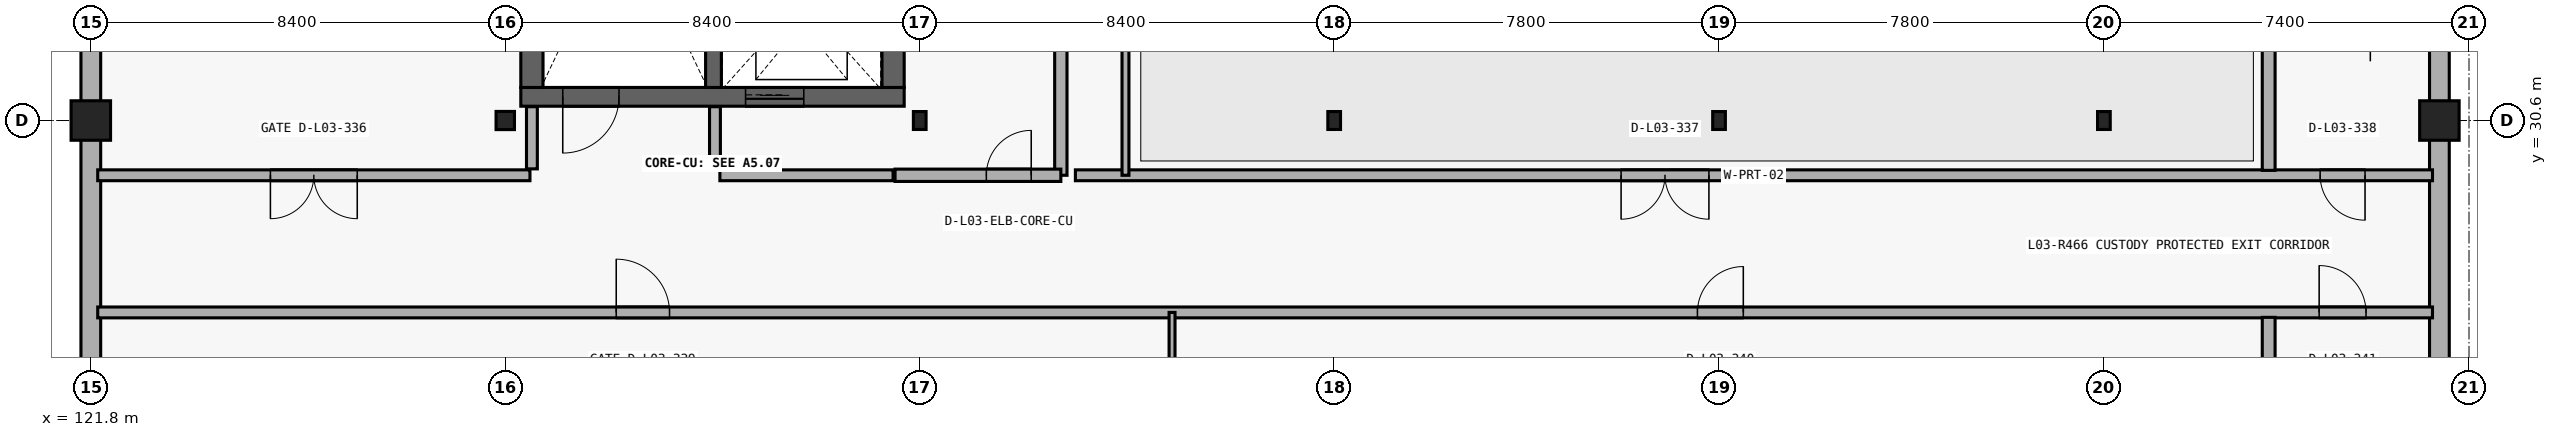
"""IFC4 building model, lengths in metres.
Left out: names, types, materials, properties, quantities, classifications, styles, units other than length and angle.
Written with IfcOpenShell. Run it as: python <this file> out.ifc"""

import sys

from ifc_helpers import new_model, si_unit, direction, frame, frame_2d, origin_with_axes, origin_2d_with_axis, place, context, subcontext, project, spatial, rectangle, circle, i_section, extrude, element, fill, save


model = new_model("IFC4")
c1 = context("Model", 3, precision=1e-05, world=origin_with_axes(), true_north=direction((0.0, 1.0)))
c2 = subcontext(c1, "Body", "Model", "MODEL_VIEW")
j1 = project(units=[si_unit("LENGTHUNIT", "METRE"), si_unit("PLANEANGLEUNIT", "RADIAN")], contexts=[c1])
p1 = place(None, origin_with_axes())
s1 = spatial("IfcSite", under=j1, at=p1, CompositionType="ELEMENT")
p2 = place(p1, origin_with_axes())
s2 = spatial("IfcBuilding", under=s1, at=p2, CompositionType="ELEMENT")
p3 = place(p2, frame((0.0, 0.0, 15.6), z_axis=(0.0, 0.0, 1.0), x_axis=(1.0, 0.0, 0.0)))
s3 = spatial("IfcBuildingStorey", under=s2, at=p3, CompositionType="ELEMENT", Elevation=15.6)
p4 = place(None, frame((169.4, 7.06, 15.6), z_axis=(0.0, 0.0, 1.0), x_axis=(0.0, 1.0, 0.0)))
e1 = element("IfcWall", 1, at=p4, inside=s3, PredefinedType="SOLIDWALL", context=c2, shape_type="SweptSolid", body=[
    extrude(rectangle(XDim=47.28, YDim=0.4, at=frame_2d((23.64, 0.0), x_axis=(1.0, 0.0))), origin_with_axes(), (0.0, 0.0, 1.0), 4.074),
])
p5 = place(None, frame((121.8, 54.34, 15.6), z_axis=(0.0, 0.0, 1.0), x_axis=(0.0, -1.0, 0.0)))
e2 = element("IfcWall", 2, at=p5, inside=s3, PredefinedType="SOLIDWALL", context=c2, shape_type="SweptSolid", body=[
    extrude(rectangle(XDim=47.28, YDim=0.4, at=frame_2d((23.64, 0.0), x_axis=(1.0, 0.0))), origin_with_axes(), (0.0, 0.0, 1.0), 4.114),
])
p6 = place(None, frame((130.515, 31.08, 15.6), z_axis=(0.0, 0.0, 1.0), x_axis=(1.0, 0.0, 0.0)))
e3 = element("IfcWall", 3, at=p6, inside=s3, PredefinedType="SHEAR", context=c2, shape_type="SweptSolid", body=[
    extrude(rectangle(XDim=7.77, YDim=0.38, at=frame_2d((3.885, 0.0), x_axis=(1.0, 0.0))), origin_with_axes(), (0.0, 0.0, 1.0), 4.8),
])
p7 = place(None, frame((131.935, 31.08, 15.6), z_axis=(0.0, 0.0, 1.0), x_axis=(1.0, 0.0, 0.0)))
e4 = element("IfcOpeningElement", 4, at=p7, cuts=e3, PredefinedType="OPENING", context=c2, shape_type="SweptSolid", body=[
    extrude(rectangle(XDim=1.14, YDim=2.18, at=frame_2d((0.0, 1.09), x_axis=(1.0, 0.0))), frame((0.0, 0.2, 0.0), z_axis=(0.0, -1.0, 0.0), x_axis=(1.0, 0.0, 0.0)), (0.0, 0.0, 1.0), 0.4),
])
p8 = place(None, frame((135.66, 31.08, 15.6), z_axis=(0.0, 0.0, 1.0), x_axis=(1.0, 0.0, 0.0)))
e5 = element("IfcOpeningElement", 5, at=p8, cuts=e3, PredefinedType="OPENING", context=c2, shape_type="SweptSolid", body=[
    extrude(rectangle(XDim=1.18, YDim=2.24, at=frame_2d((0.0, 1.12), x_axis=(1.0, 0.0))), frame((0.0, 0.2, 0.0), z_axis=(0.0, -1.0, 0.0), x_axis=(1.0, 0.0, 0.0)), (0.0, 0.0, 1.0), 0.4),
])
p9 = place(None, frame((138.06, 31.27, 15.6), z_axis=(0.0, 0.0, 1.0), x_axis=(0.0, 1.0, 0.0)))
e6 = element("IfcWall", 6, at=p9, inside=s3, PredefinedType="SHEAR", context=c2, shape_type="SweptSolid", body=[
    extrude(rectangle(XDim=7.06, YDim=0.45, at=frame_2d((3.53, 0.0), x_axis=(1.0, 0.0))), origin_with_axes(), (0.0, 0.0, 1.0), 4.8),
])
p10 = place(None, frame((138.06, 37.07, 15.6), z_axis=(0.0, 0.0, 1.0), x_axis=(0.0, 1.0, 0.0)))
e7 = element("IfcOpeningElement", 7, at=p10, cuts=e6, PredefinedType="OPENING", context=c2, shape_type="SweptSolid", body=[
    extrude(rectangle(XDim=1.18, YDim=2.24, at=frame_2d((0.0, 1.12), x_axis=(1.0, 0.0))), frame((0.0, 0.235, 0.0), z_axis=(0.0, -1.0, 0.0), x_axis=(1.0, 0.0, 0.0)), (0.0, 0.0, 1.0), 0.47),
])
p11 = place(None, frame((130.74, 38.33, 15.6), z_axis=(0.0, 0.0, 1.0), x_axis=(0.0, -1.0, 0.0)))
e8 = element("IfcWall", 8, at=p11, inside=s3, PredefinedType="SHEAR", context=c2, shape_type="SweptSolid", body=[
    extrude(rectangle(XDim=7.06, YDim=0.45, at=frame_2d((3.53, 0.0), x_axis=(1.0, 0.0))), origin_with_axes(), (0.0, 0.0, 1.0), 4.8),
])
p12 = place(None, frame((134.42, 31.27, 15.6), z_axis=(0.0, 0.0, 1.0), x_axis=(0.0, 1.0, 0.0)))
e9 = element("IfcWall", 9, at=p12, inside=s3, PredefinedType="SHEAR", context=c2, shape_type="SweptSolid", body=[
    extrude(rectangle(XDim=7.06, YDim=0.32, at=frame_2d((3.53, 0.0), x_axis=(1.0, 0.0))), origin_with_axes(), (0.0, 0.0, 1.0), 4.8),
])
p13 = place(None, frame((141.46, 29.49, 15.6), z_axis=(0.0, 0.0, 1.0), x_axis=(0.0, 1.0, 0.0)))
e10 = element("IfcWall", 10, at=p13, inside=s3, PredefinedType="PARTITIONING", context=c2, shape_type="SweptSolid", body=[
    extrude(rectangle(XDim=9.03, YDim=0.25, at=frame_2d((4.515, 0.0), x_axis=(1.0, 0.0))), origin_with_axes(), (0.0, 0.0, 1.0), 4.48),
])
p14 = place(None, frame((138.1, 29.49, 15.6), z_axis=(0.0, 0.0, 1.0), x_axis=(1.0, 0.0, 0.0)))
e11 = element("IfcWall", 11, at=p14, inside=s3, PredefinedType="PARTITIONING", context=c2, shape_type="SweptSolid", body=[
    extrude(rectangle(XDim=3.36, YDim=0.25, at=frame_2d((1.68, 0.0), x_axis=(1.0, 0.0))), origin_with_axes(), (0.0, 0.0, 1.0), 4.48),
])
p15 = place(None, frame((140.405, 29.49, 15.6), z_axis=(0.0, 0.0, 1.0), x_axis=(1.0, 0.0, 0.0)))
e12 = element("IfcOpeningElement", 12, at=p15, cuts=e11, PredefinedType="OPENING", context=c2, shape_type="SweptSolid", body=[
    extrude(rectangle(XDim=0.91, YDim=2.12, at=frame_2d((0.0, 1.06), x_axis=(1.0, 0.0))), frame((0.0, 0.135, 0.0), z_axis=(0.0, -1.0, 0.0), x_axis=(1.0, 0.0, 0.0)), (0.0, 0.0, 1.0), 0.27),
])
for number, where, z_axis, x_axis in (
    (13, (130.74, 29.62, 15.6), (0.0, 0.0, 1.0), (0.0, 1.0, 0.0)),
    (14, (134.45, 29.62, 15.6), (0.0, 0.0, 1.0), (0.0, 1.0, 0.0)),
):
    element("IfcWall", number, at=place(None, frame(where, z_axis=z_axis, x_axis=x_axis)), inside=s3, PredefinedType="PARTITIONING", context=c2, shape_type="SweptSolid", body=[
        extrude(rectangle(XDim=1.26, YDim=0.22, at=frame_2d((0.63, 0.0), x_axis=(1.0, 0.0))), origin_with_axes(), (0.0, 0.0, 1.0), 4.48),
    ])
p16 = place(None, frame((121.94, 29.49, 15.6), z_axis=(0.0, 0.0, 1.0), x_axis=(1.0, 0.0, 0.0)))
e15 = element("IfcWall", 15, at=p16, inside=s3, PredefinedType="PARTITIONING", context=c2, shape_type="SweptSolid", body=[
    extrude(rectangle(XDim=8.76, YDim=0.22, at=frame_2d((4.38, 0.0), x_axis=(1.0, 0.0))), origin_with_axes(), (0.0, 0.0, 1.0), 4.48),
])
p17 = place(None, frame((126.32, 29.49, 15.6), z_axis=(0.0, 0.0, 1.0), x_axis=(1.0, 0.0, 0.0)))
e16 = element("IfcOpeningElement", 16, at=p17, cuts=e15, PredefinedType="OPENING", context=c2, shape_type="SweptSolid", body=[
    extrude(rectangle(XDim=1.76, YDim=2.26, at=frame_2d((0.0, 1.13), x_axis=(1.0, 0.0))), frame((0.0, 0.12, 0.0), z_axis=(0.0, -1.0, 0.0), x_axis=(1.0, 0.0, 0.0)), (0.0, 0.0, 1.0), 0.24),
])
p18 = place(None, frame((134.55, 29.49, 15.6), z_axis=(0.0, 0.0, 1.0), x_axis=(1.0, 0.0, 0.0)))
e17 = element("IfcWall", 17, at=p18, inside=s3, PredefinedType="PARTITIONING", context=c2, shape_type="SweptSolid", body=[
    extrude(rectangle(XDim=3.51, YDim=0.22, at=frame_2d((1.755, 0.0), x_axis=(1.0, 0.0))), origin_with_axes(), (0.0, 0.0, 1.0), 4.48),
])
p19 = place(None, frame((141.755, 29.49, 15.6), z_axis=(0.0, 0.0, 1.0), x_axis=(1.0, 0.0, 0.0)))
e18 = element("IfcWall", 18, at=p19, inside=s3, PredefinedType="PARTITIONING", context=c2, shape_type="SweptSolid", body=[
    extrude(rectangle(XDim=27.505, YDim=0.22, at=frame_2d((13.752, 0.0), x_axis=(1.0, 0.0))), origin_with_axes(), (0.0, 0.0, 1.0), 4.48),
])
p20 = place(None, frame((153.705, 29.49, 15.6), z_axis=(0.0, 0.0, 1.0), x_axis=(1.0, 0.0, 0.0)))
e19 = element("IfcOpeningElement", 19, at=p20, cuts=e18, PredefinedType="OPENING", context=c2, shape_type="SweptSolid", body=[
    extrude(rectangle(XDim=1.78, YDim=2.48, at=frame_2d((0.0, 1.24), x_axis=(1.0, 0.0))), frame((0.0, 0.12, 0.0), z_axis=(0.0, -1.0, 0.0), x_axis=(1.0, 0.0, 0.0)), (0.0, 0.0, 1.0), 0.24),
])
p21 = place(None, frame((167.438, 29.49, 15.6), z_axis=(0.0, 0.0, 1.0), x_axis=(1.0, 0.0, 0.0)))
e20 = element("IfcOpeningElement", 20, at=p21, cuts=e18, PredefinedType="OPENING", context=c2, shape_type="SweptSolid", body=[
    extrude(rectangle(XDim=0.91, YDim=2.12, at=frame_2d((0.0, 1.06), x_axis=(1.0, 0.0))), frame((0.0, 0.12, 0.0), z_axis=(0.0, -1.0, 0.0), x_axis=(1.0, 0.0, 0.0)), (0.0, 0.0, 1.0), 0.24),
])
p22 = place(None, frame((121.94, 26.71, 15.6), z_axis=(0.0, 0.0, 1.0), x_axis=(1.0, 0.0, 0.0)))
e21 = element("IfcWall", 21, at=p22, inside=s3, PredefinedType="PARTITIONING", context=c2, shape_type="SweptSolid", body=[
    extrude(rectangle(XDim=47.32, YDim=0.22, at=frame_2d((23.66, 0.0), x_axis=(1.0, 0.0))), origin_with_axes(), (0.0, 0.0, 1.0), 4.48),
])
p23 = place(None, frame((132.989, 26.71, 15.6), z_axis=(0.0, 0.0, 1.0), x_axis=(1.0, 0.0, 0.0)))
e22 = element("IfcOpeningElement", 22, at=p23, cuts=e21, PredefinedType="OPENING", context=c2, shape_type="SweptSolid", body=[
    extrude(rectangle(XDim=1.08, YDim=2.18, at=frame_2d((0.0, 1.09), x_axis=(1.0, 0.0))), frame((0.0, 0.12, 0.0), z_axis=(0.0, -1.0, 0.0), x_axis=(1.0, 0.0, 0.0)), (0.0, 0.0, 1.0), 0.24),
])
p24 = place(None, frame((154.827, 26.71, 15.6), z_axis=(0.0, 0.0, 1.0), x_axis=(1.0, 0.0, 0.0)))
e23 = element("IfcOpeningElement", 23, at=p24, cuts=e21, PredefinedType="OPENING", context=c2, shape_type="SweptSolid", body=[
    extrude(rectangle(XDim=0.93, YDim=2.1, at=frame_2d((0.0, 1.05), x_axis=(1.0, 0.0))), frame((0.0, 0.12, 0.0), z_axis=(0.0, -1.0, 0.0), x_axis=(1.0, 0.0, 0.0)), (0.0, 0.0, 1.0), 0.24),
])
p25 = place(None, frame((167.438, 26.71, 15.6), z_axis=(0.0, 0.0, 1.0), x_axis=(1.0, 0.0, 0.0)))
e24 = element("IfcOpeningElement", 24, at=p25, cuts=e21, PredefinedType="OPENING", context=c2, shape_type="SweptSolid", body=[
    extrude(rectangle(XDim=0.95, YDim=2.1, at=frame_2d((0.0, 1.05), x_axis=(1.0, 0.0))), frame((0.0, 0.12, 0.0), z_axis=(0.0, -1.0, 0.0), x_axis=(1.0, 0.0, 0.0)), (0.0, 0.0, 1.0), 0.24),
])
p26 = place(None, frame((165.94, 29.59, 15.6), z_axis=(0.0, 0.0, 1.0), x_axis=(0.0, 1.0, 0.0)))
e25 = element("IfcWall", 25, at=p26, inside=s3, PredefinedType="PLUMBINGWALL", context=c2, shape_type="SweptSolid", body=[
    extrude(rectangle(XDim=6.43, YDim=0.26, at=frame_2d((3.215, 0.0), x_axis=(1.0, 0.0))), origin_with_axes(), (0.0, 0.0, 1.0), 4.48),
])
p27 = place(None, frame((165.94, 20.18, 15.6), z_axis=(0.0, 0.0, 1.0), x_axis=(0.0, 1.0, 0.0)))
e26 = element("IfcWall", 26, at=p27, inside=s3, PredefinedType="PLUMBINGWALL", context=c2, shape_type="SweptSolid", body=[
    extrude(rectangle(XDim=6.43, YDim=0.26, at=frame_2d((3.215, 0.0), x_axis=(1.0, 0.0))), origin_with_axes(), (0.0, 0.0, 1.0), 4.48),
])
p28 = place(None, frame((142.77, 29.49, 15.6), z_axis=(0.0, 0.0, 1.0), x_axis=(0.0, 1.0, 0.0)))
e27 = element("IfcWall", 27, at=p28, inside=s3, PredefinedType="PARTITIONING", context=c2, shape_type="SweptSolid", body=[
    extrude(rectangle(XDim=24.97, YDim=0.14, at=frame_2d((12.485, 0.0), x_axis=(1.0, 0.0))), origin_with_axes(), (0.0, 0.0, 1.0), 4.48),
])
p29 = place(None, frame((143.714, 6.94, 15.6), z_axis=(0.0, 0.0, 1.0), x_axis=(0.0, 1.0, 0.0)))
e28 = element("IfcWall", 28, at=p29, inside=s3, PredefinedType="PARTITIONING", context=c2, shape_type="SweptSolid", body=[
    extrude(rectangle(XDim=19.77, YDim=0.12, at=frame_2d((9.885, 0.0), x_axis=(1.0, 0.0))), origin_with_axes(), (0.0, 0.0, 1.0), 4.48),
])
p30 = place(None, frame((121.8, 30.6, 15.6), z_axis=(0.0, 0.0, 1.0), x_axis=(1.0, 0.0, 0.0)))
e29 = element("IfcColumn", 29, at=p30, inside=s3, PredefinedType="COLUMN", context=c2, shape_type="SweptSolid", body=[
    extrude(circle(Radius=0.4, at=origin_2d_with_axis()), origin_with_axes(), (0.0, 0.0, 1.0), 4.8),
])
p31 = place(None, frame((130.2, 30.6, 15.6), z_axis=(0.0, 0.0, 1.0), x_axis=(1.0, 0.0, 0.0)))
e30 = element("IfcColumn", 30, at=p31, inside=s3, PredefinedType="COLUMN", context=c2, shape_type="SweptSolid", body=[
    extrude(i_section(OverallWidth=0.373, OverallDepth=0.368, WebThickness=0.015, FlangeThickness=0.024, at=origin_2d_with_axis()), origin_with_axes(), (0.0, 0.0, 1.0), 4.8),
])
for number, where, z_axis, x_axis in (
    (31, (138.6, 30.6, 15.6), (0.0, 0.0, 1.0), (1.0, 0.0, 0.0)),
    (32, (147.0, 30.6, 15.6), (0.0, 0.0, 1.0), (1.0, 0.0, 0.0)),
    (33, (154.8, 30.6, 15.6), (0.0, 0.0, 1.0), (1.0, 0.0, 0.0)),
    (34, (162.6, 30.6, 15.6), (0.0, 0.0, 1.0), (1.0, 0.0, 0.0)),
):
    element("IfcColumn", number, at=place(None, frame(where, z_axis=z_axis, x_axis=x_axis)), inside=s3, PredefinedType="COLUMN", context=c2, shape_type="SweptSolid", body=[
        extrude(i_section(OverallWidth=0.257, OverallDepth=0.363, WebThickness=0.013, FlangeThickness=0.022, at=origin_2d_with_axis()), origin_with_axes(), (0.0, 0.0, 1.0), 4.8),
    ])
p32 = place(None, frame((169.4, 30.6, 15.6), z_axis=(0.0, 0.0, 1.0), x_axis=(1.0, 0.0, 0.0)))
e35 = element("IfcColumn", 35, at=p32, inside=s3, PredefinedType="COLUMN", context=c2, shape_type="SweptSolid", body=[
    extrude(circle(Radius=0.4, at=origin_2d_with_axis()), origin_with_axes(), (0.0, 0.0, 1.0), 4.8),
])
p33 = place(None, frame((131.935, 31.08, 15.6), z_axis=(0.0, 0.0, 1.0), x_axis=(-1.0, 0.0, 0.0)))
e36 = element("IfcDoor", 36, at=p33, inside=s3, OperationType="SINGLE_SWING_LEFT", PredefinedType="DOOR", context=c2, shape_type="SweptSolid", body=[
    extrude(rectangle(XDim=1.14, YDim=2.18, at=frame_2d((0.0, 1.09), x_axis=(1.0, 0.0))), frame((0.0, 0.04, 0.0), z_axis=(0.0, -1.0, 0.0), x_axis=(1.0, 0.0, 0.0)), (0.0, 0.0, 1.0), 0.08),
])
fill(e4, e36)
p34 = place(None, frame((135.66, 31.08, 15.6), z_axis=(0.0, 0.0, 1.0), x_axis=(-1.0, 0.0, 0.0)))
e37 = element("IfcDoor", 37, at=p34, inside=s3, OperationType="SLIDING_TO_LEFT", PredefinedType="DOOR", context=c2, shape_type="SweptSolid", body=[
    extrude(rectangle(XDim=1.18, YDim=2.24, at=frame_2d((0.0, 1.12), x_axis=(1.0, 0.0))), frame((0.0, 0.04, 0.0), z_axis=(0.0, -1.0, 0.0), x_axis=(1.0, 0.0, 0.0)), (0.0, 0.0, 1.0), 0.08),
])
fill(e5, e37)
p35 = place(None, frame((140.405, 29.49, 15.6), z_axis=(0.0, 0.0, 1.0), x_axis=(1.0, 0.0, 0.0)))
e38 = element("IfcDoor", 38, at=p35, inside=s3, OperationType="SINGLE_SWING_RIGHT", PredefinedType="DOOR", context=c2, shape_type="SweptSolid", body=[
    extrude(rectangle(XDim=0.91, YDim=2.12, at=frame_2d((0.0, 1.06), x_axis=(1.0, 0.0))), frame((0.0, 0.04, 0.0), z_axis=(0.0, -1.0, 0.0), x_axis=(1.0, 0.0, 0.0)), (0.0, 0.0, 1.0), 0.08),
])
fill(e12, e38)
p36 = place(None, frame((126.32, 29.49, 15.6), z_axis=(0.0, 0.0, 1.0), x_axis=(-1.0, 0.0, 0.0)))
e39 = element("IfcDoor", 39, at=p36, inside=s3, OperationType="DOUBLE_DOOR_SINGLE_SWING", PredefinedType="GATE", context=c2, shape_type="SweptSolid", body=[
    extrude(rectangle(XDim=1.76, YDim=2.26, at=frame_2d((0.0, 1.13), x_axis=(1.0, 0.0))), frame((0.0, 0.04, 0.0), z_axis=(0.0, -1.0, 0.0), x_axis=(1.0, 0.0, 0.0)), (0.0, 0.0, 1.0), 0.08),
])
fill(e16, e39)
p37 = place(None, frame((153.705, 29.49, 15.6), z_axis=(0.0, 0.0, 1.0), x_axis=(-1.0, 0.0, 0.0)))
e40 = element("IfcDoor", 40, at=p37, inside=s3, OperationType="DOUBLE_DOOR_SINGLE_SWING", PredefinedType="DOOR", context=c2, shape_type="SweptSolid", body=[
    extrude(rectangle(XDim=1.78, YDim=2.48, at=frame_2d((0.0, 1.24), x_axis=(1.0, 0.0))), frame((0.0, 0.04, 0.0), z_axis=(0.0, -1.0, 0.0), x_axis=(1.0, 0.0, 0.0)), (0.0, 0.0, 1.0), 0.08),
])
fill(e19, e40)
p38 = place(None, frame((167.438, 29.49, 15.6), z_axis=(0.0, 0.0, 1.0), x_axis=(-1.0, 0.0, 0.0)))
e41 = element("IfcDoor", 41, at=p38, inside=s3, OperationType="SINGLE_SWING_RIGHT", PredefinedType="DOOR", context=c2, shape_type="SweptSolid", body=[
    extrude(rectangle(XDim=0.91, YDim=2.12, at=frame_2d((0.0, 1.06), x_axis=(1.0, 0.0))), frame((0.0, 0.04, 0.0), z_axis=(0.0, -1.0, 0.0), x_axis=(1.0, 0.0, 0.0)), (0.0, 0.0, 1.0), 0.08),
])
fill(e20, e41)
p39 = place(None, frame((132.989, 26.71, 15.6), z_axis=(0.0, 0.0, 1.0), x_axis=(1.0, 0.0, 0.0)))
e42 = element("IfcDoor", 42, at=p39, inside=s3, OperationType="SINGLE_SWING_LEFT", PredefinedType="GATE", context=c2, shape_type="SweptSolid", body=[
    extrude(rectangle(XDim=1.08, YDim=2.18, at=frame_2d((0.0, 1.09), x_axis=(1.0, 0.0))), frame((0.0, 0.04, 0.0), z_axis=(0.0, -1.0, 0.0), x_axis=(1.0, 0.0, 0.0)), (0.0, 0.0, 1.0), 0.08),
])
fill(e22, e42)
p40 = place(None, frame((154.827, 26.71, 15.6), z_axis=(0.0, 0.0, 1.0), x_axis=(1.0, 0.0, 0.0)))
e43 = element("IfcDoor", 43, at=p40, inside=s3, OperationType="SINGLE_SWING_RIGHT", PredefinedType="DOOR", context=c2, shape_type="SweptSolid", body=[
    extrude(rectangle(XDim=0.93, YDim=2.1, at=frame_2d((0.0, 1.05), x_axis=(1.0, 0.0))), frame((0.0, 0.04, 0.0), z_axis=(0.0, -1.0, 0.0), x_axis=(1.0, 0.0, 0.0)), (0.0, 0.0, 1.0), 0.08),
])
fill(e23, e43)
p41 = place(None, frame((167.438, 26.71, 15.6), z_axis=(0.0, 0.0, 1.0), x_axis=(1.0, 0.0, 0.0)))
e44 = element("IfcDoor", 44, at=p41, inside=s3, OperationType="SINGLE_SWING_LEFT", PredefinedType="DOOR", context=c2, shape_type="SweptSolid", body=[
    extrude(rectangle(XDim=0.95, YDim=2.1, at=frame_2d((0.0, 1.05), x_axis=(1.0, 0.0))), frame((0.0, 0.04, 0.0), z_axis=(0.0, -1.0, 0.0), x_axis=(1.0, 0.0, 0.0)), (0.0, 0.0, 1.0), 0.08),
])
fill(e24, e44)
save(model, sys.argv[1])
